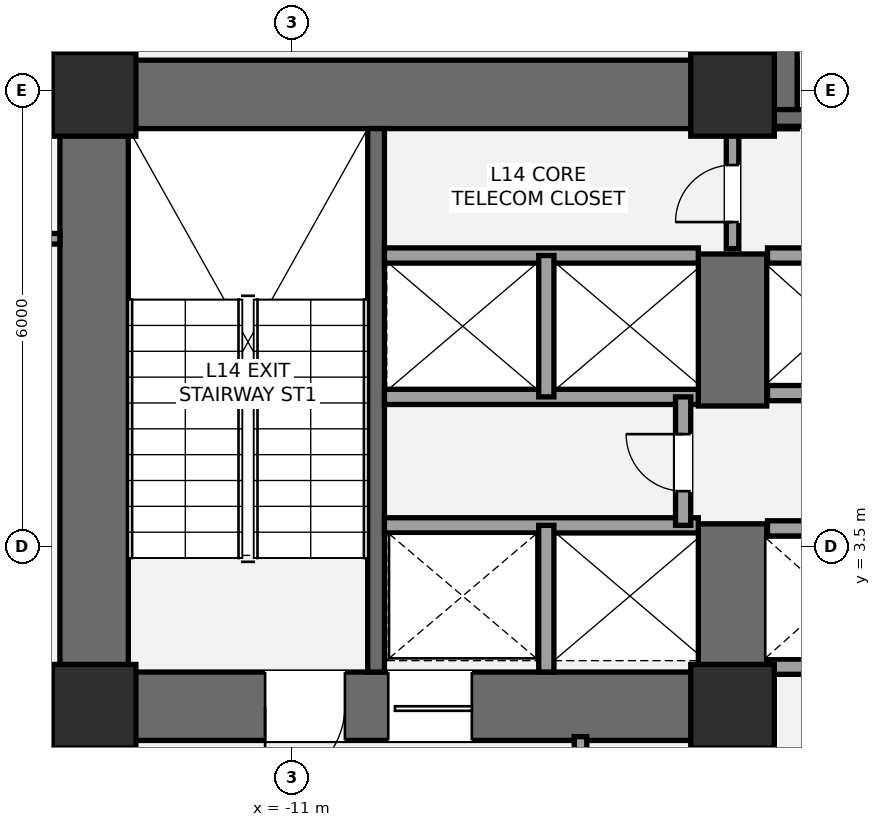
"""IFC4 building model, lengths in metres.
Left out: names, types, materials, properties, quantities, classifications, styles, units other than length and angle.
Written with IfcOpenShell. Run it as: python <this file> out.ifc"""

import sys

from ifc_helpers import new_model, si_unit, direction, frame, frame_2d, origin, origin_2d, place, context, subcontext, project, spatial, rectangle, extrude, element, fill, save


model = new_model("IFC4")
c1 = context("Model", 3, precision=1e-05, world=origin(), true_north=direction((0.0, 1.0)))
c2 = subcontext(c1, "Body", "Model", "MODEL_VIEW")
j1 = project(units=[si_unit("LENGTHUNIT", "METRE"), si_unit("PLANEANGLEUNIT", "RADIAN")], contexts=[c1])
p1 = place(None, origin())
s1 = spatial("IfcSite", under=j1, at=p1, CompositionType="ELEMENT")
p2 = place(p1, origin())
s2 = spatial("IfcBuilding", under=s1, at=p2, CompositionType="ELEMENT")
p3 = place(p2, frame((0.0, 0.0, 55.8)))
s3 = spatial("IfcBuildingStorey", under=s2, at=p3, CompositionType="ELEMENT", Elevation=55.8)
p4 = place(p3, frame((-13.6, 0.95, 0.0), z_axis=(0.0, 0.0, 1.0), x_axis=(0.0, 1.0, 0.0)))
e1 = element("IfcWall", 1, at=p4, inside=s3, PredefinedType="SHEAR", context=c2, shape_type="SweptSolid", body=[
    extrude(rectangle(XDim=8.95, YDim=0.9, at=frame_2d((4.475, 0.0))), origin(), (0.0, 0.0, 1.0), 3.6),
])
p5 = place(p3, frame((-14.05, 9.45, 0.0), z_axis=(0.0, 0.0, 1.0), x_axis=(1.0, 0.0, 0.0)))
e2 = element("IfcWall", 2, at=p5, inside=s3, PredefinedType="SHEAR", context=c2, shape_type="SweptSolid", body=[
    extrude(rectangle(XDim=9.7, YDim=0.9, at=frame_2d((4.85, 0.0))), origin(), (0.0, 0.0, 1.0), 3.6),
])
p6 = place(p3, frame((-4.75, 1.4, 0.0), z_axis=(0.0, 0.0, 1.0), x_axis=(-1.0, 0.0, 0.0)))
e3 = element("IfcWall", 3, at=p6, inside=s3, PredefinedType="SHEAR", context=c2, shape_type="SweptSolid", body=[
    extrude(rectangle(XDim=9.3, YDim=0.9, at=frame_2d((4.65, 0.0))), origin(), (0.0, 0.0, 1.0), 3.6),
])
p7 = place(p6, frame((5.55, 0.0, 0.0)))
e4 = element("IfcOpeningElement", 4, at=p7, cuts=e3, PredefinedType="OPENING", context=c2, shape_type="SweptSolid", body=[
    extrude(rectangle(XDim=1.05, YDim=2.15, at=frame_2d((0.525, 1.075))), frame((0.0, 0.46, 0.0), z_axis=(0.0, -1.0, 0.0), x_axis=(1.0, 0.0, 0.0)), (0.0, 0.0, 1.0), 0.92),
])
p8 = place(p6, frame((3.88, 0.0, 0.0)))
e5 = element("IfcOpeningElement", 5, at=p8, cuts=e3, PredefinedType="OPENING", context=c2, shape_type="SweptSolid", body=[
    extrude(rectangle(XDim=1.1, YDim=2.2, at=frame_2d((0.55, 1.1))), frame((0.0, 0.46, 0.0), z_axis=(0.0, -1.0, 0.0), x_axis=(1.0, 0.0, 0.0)), (0.0, 0.0, 1.0), 0.92),
])
p9 = place(p3, frame((-5.2, 0.95, 0.0), z_axis=(0.0, 0.0, 1.0), x_axis=(0.0, 1.0, 0.0)))
e6 = element("IfcWall", 6, at=p9, inside=s3, PredefinedType="SHEAR", context=c2, shape_type="SweptSolid", body=[
    extrude(rectangle(XDim=2.85, YDim=0.9, at=frame_2d((1.425, 0.0))), origin(), (0.0, 0.0, 1.0), 3.6),
])
p10 = place(p3, frame((-5.2, 5.35, 0.0), z_axis=(0.0, 0.0, 1.0), x_axis=(0.0, 1.0, 0.0)))
e7 = element("IfcWall", 7, at=p10, inside=s3, PredefinedType="SHEAR", context=c2, shape_type="SweptSolid", body=[
    extrude(rectangle(XDim=2.0, YDim=0.9, at=frame_2d((1.0, 0.0))), origin(), (0.0, 0.0, 1.0), 3.6),
])
p11 = place(p3, frame((-9.89, 1.85, 0.0), z_axis=(0.0, 0.0, 1.0), x_axis=(0.0, 1.0, 0.0)))
e8 = element("IfcWall", 8, at=p11, inside=s3, PredefinedType="SHEAR", context=c2, shape_type="SweptSolid", body=[
    extrude(rectangle(XDim=7.15, YDim=0.22, at=frame_2d((3.575, 0.0))), origin(), (0.0, 0.0, 1.0), 3.6),
])
p12 = place(p3, frame((-4.8, 9.0, 0.0), z_axis=(0.0, 0.0, 1.0), x_axis=(0.0, 1.0, 0.0)))
e9 = element("IfcWall", 9, at=p12, inside=s3, PredefinedType="SHEAR", context=c2, shape_type="SweptSolid", body=[
    extrude(rectangle(XDim=4.3, YDim=0.9, at=frame_2d((2.15, 0.0))), origin(), (0.0, 0.0, 1.0), 3.6),
])
p13 = place(p3, frame((-4.7, 9.14, 0.0), z_axis=(0.0, 0.0, 1.0), x_axis=(1.0, 0.0, 0.0)))
e10 = element("IfcWall", 10, at=p13, inside=s3, PredefinedType="SHEAR", context=c2, shape_type="SweptSolid", body=[
    extrude(rectangle(XDim=9.3, YDim=0.22, at=frame_2d((4.65, 0.0))), origin(), (0.0, 0.0, 1.0), 3.6),
])
p14 = place(p13, frame((1.15, 0.0, 0.0)))
e11 = element("IfcOpeningElement", 11, at=p14, cuts=e10, PredefinedType="OPENING", context=c2, shape_type="SweptSolid", body=[
    extrude(rectangle(XDim=1.05, YDim=2.15, at=frame_2d((0.525, 1.075))), frame((0.0, 0.12, 0.0), z_axis=(0.0, -1.0, 0.0), x_axis=(1.0, 0.0, 0.0)), (0.0, 0.0, 1.0), 0.24),
])
for number, where, z_axis, x_axis in (
    (12, (-13.6, 1.4, 0.0), (0.0, 0.0, 1.0), (1.0, 0.0, 0.0)),
    (13, (-13.6, 9.45, 0.0), (0.0, 0.0, 1.0), (1.0, 0.0, 0.0)),
    (14, (-5.2, 1.4, 0.0), (0.0, 0.0, 1.0), (1.0, 0.0, 0.0)),
    (15, (-5.2, 9.45, 0.0), (0.0, 0.0, 1.0), (1.0, 0.0, 0.0)),
):
    element("IfcColumn", number, at=place(p3, frame(where, z_axis=z_axis, x_axis=x_axis)), inside=s3, PredefinedType="COLUMN", context=c2, shape_type="SweptSolid", body=[
        extrude(rectangle(XDim=1.1, YDim=1.1, at=origin_2d()), origin(), (0.0, 0.0, 1.0), 3.6),
    ])
p15 = place(p3, frame((-13.45, -2.15, 0.0), z_axis=(0.0, 0.0, 1.0), x_axis=(0.0, 1.0, 0.0)))
e16 = element("IfcWall", 16, at=p15, inside=s3, PredefinedType="PARTITIONING", context=c2, shape_type="SweptSolid", body=[
    extrude(rectangle(XDim=3.15, YDim=0.165, at=frame_2d((1.575, 0.0))), origin(), (0.0, 0.0, 1.0), 2.853),
])
p16 = place(p15, frame((1.15, 0.0, 0.0)))
e17 = element("IfcOpeningElement", 17, at=p16, cuts=e16, PredefinedType="OPENING", context=c2, shape_type="SweptSolid", body=[
    extrude(rectangle(XDim=1.05, YDim=2.15, at=frame_2d((0.525, 1.075))), frame((0.0, 0.093, 0.0), z_axis=(0.0, -1.0, 0.0), x_axis=(1.0, 0.0, 0.0)), (0.0, 0.0, 1.0), 0.185),
])
p17 = place(p3, frame((-7.2, -2.15, 0.0), z_axis=(0.0, 0.0, 1.0), x_axis=(0.0, 1.0, 0.0)))
e18 = element("IfcWall", 18, at=p17, inside=s3, PredefinedType="PARTITIONING", context=c2, shape_type="SweptSolid", body=[
    extrude(rectangle(XDim=3.15, YDim=0.165, at=frame_2d((1.575, 0.0))), origin(), (0.0, 0.0, 1.0), 3.4),
])
p18 = place(p3, frame((-4.95, -2.15, 0.0), z_axis=(0.0, 0.0, 1.0), x_axis=(0.0, 1.0, 0.0)))
e19 = element("IfcWall", 19, at=p18, inside=s3, PredefinedType="SOLIDWALL", context=c2, shape_type="SweptSolid", body=[
    extrude(rectangle(XDim=3.15, YDim=0.2, at=frame_2d((1.575, 0.0))), origin(), (0.0, 0.0, 1.0), 2.853),
])
p19 = place(p18, frame((0.95, 0.0, 0.0)))
e20 = element("IfcOpeningElement", 20, at=p19, cuts=e19, PredefinedType="OPENING", context=c2, shape_type="SweptSolid", body=[
    extrude(rectangle(XDim=0.75, YDim=2.1, at=frame_2d((0.375, 1.05))), frame((0.0, 0.11, 0.0), z_axis=(0.0, -1.0, 0.0), x_axis=(1.0, 0.0, 0.0)), (0.0, 0.0, 1.0), 0.22),
])
p20 = place(p3, frame((-9.78, 3.78, 0.0), z_axis=(0.0, 0.0, 1.0), x_axis=(1.0, 0.0, 0.0)))
e21 = element("IfcWall", 21, at=p20, inside=s3, PredefinedType="SOLIDWALL", context=c2, shape_type="SweptSolid", body=[
    extrude(rectangle(XDim=4.13, YDim=0.2, at=frame_2d((2.065, 0.0))), origin(), (0.0, 0.0, 1.0), 3.4),
])
p21 = place(p3, frame((-7.65, 1.85, 0.0), z_axis=(0.0, 0.0, 1.0), x_axis=(0.0, 1.0, 0.0)))
e22 = element("IfcWall", 22, at=p21, inside=s3, PredefinedType="SOLIDWALL", context=c2, shape_type="SweptSolid", body=[
    extrude(rectangle(XDim=1.93, YDim=0.2, at=frame_2d((0.965, 0.0))), origin(), (0.0, 0.0, 1.0), 3.4),
])
for number, where, z_axis, x_axis in (
    (23, (-9.78, 5.47, 0.0), (0.0, 0.0, 1.0), (1.0, 0.0, 0.0)),
    (24, (-9.78, 7.33, 0.0), (0.0, 0.0, 1.0), (1.0, 0.0, 0.0)),
):
    element("IfcWall", number, at=place(p3, frame(where, z_axis=z_axis, x_axis=x_axis)), inside=s3, PredefinedType="SOLIDWALL", context=c2, shape_type="SweptSolid", body=[
        extrude(rectangle(XDim=4.13, YDim=0.2, at=frame_2d((2.065, 0.0))), origin(), (0.0, 0.0, 1.0), 3.4),
    ])
p22 = place(p3, frame((-7.65, 5.47, 0.0), z_axis=(0.0, 0.0, 1.0), x_axis=(0.0, 1.0, 0.0)))
e25 = element("IfcWall", 25, at=p22, inside=s3, PredefinedType="SOLIDWALL", context=c2, shape_type="SweptSolid", body=[
    extrude(rectangle(XDim=1.86, YDim=0.2, at=frame_2d((0.93, 0.0))), origin(), (0.0, 0.0, 1.0), 3.4),
])
p23 = place(p3, frame((-5.85, 3.78, 0.0), z_axis=(0.0, 0.0, 1.0), x_axis=(0.0, 1.0, 0.0)))
e26 = element("IfcWall", 26, at=p23, inside=s3, PredefinedType="SOLIDWALL", context=c2, shape_type="SweptSolid", body=[
    extrude(rectangle(XDim=1.69, YDim=0.2, at=frame_2d((0.845, 0.0))), origin(), (0.0, 0.0, 1.0), 3.4),
])
p24 = place(p23, frame((0.45, 0.0, 0.0)))
e27 = element("IfcOpeningElement", 27, at=p24, cuts=e26, PredefinedType="OPENING", context=c2, shape_type="SweptSolid", body=[
    extrude(rectangle(XDim=0.75, YDim=2.1, at=frame_2d((0.375, 1.05))), frame((0.0, 0.11, 0.0), z_axis=(0.0, -1.0, 0.0), x_axis=(1.0, 0.0, 0.0)), (0.0, 0.0, 1.0), 0.22),
])
p25 = place(p3, frame((-4.74, 1.92, 0.0), z_axis=(0.0, 0.0, 1.0), x_axis=(1.0, 0.0, 0.0)))
e28 = element("IfcWall", 28, at=p25, inside=s3, PredefinedType="SOLIDWALL", context=c2, shape_type="SweptSolid", body=[
    extrude(rectangle(XDim=3.86, YDim=0.2, at=frame_2d((1.93, 0.0))), origin(), (0.0, 0.0, 1.0), 2.39),
])
p26 = place(p25, frame((0.55, 0.0, 0.0)))
e29 = element("IfcOpeningElement", 29, at=p26, cuts=e28, PredefinedType="OPENING", context=c2, shape_type="SweptSolid", body=[
    extrude(rectangle(XDim=1.1, YDim=2.2, at=frame_2d((0.55, 1.1))), frame((0.0, 0.11, 0.0), z_axis=(0.0, -1.0, 0.0), x_axis=(1.0, 0.0, 0.0)), (0.0, 0.0, 1.0), 0.22),
])
p27 = place(p25, frame((2.55, 0.0, 0.0)))
e30 = element("IfcOpeningElement", 30, at=p27, cuts=e28, PredefinedType="OPENING", context=c2, shape_type="SweptSolid", body=[
    extrude(rectangle(XDim=1.1, YDim=2.2, at=frame_2d((0.55, 1.1))), frame((0.0, 0.11, 0.0), z_axis=(0.0, -1.0, 0.0), x_axis=(1.0, 0.0, 0.0)), (0.0, 0.0, 1.0), 0.22),
])
for number, where, z_axis, x_axis in (
    (31, (-4.74, 3.74, 0.0), (0.0, 0.0, 1.0), (1.0, 0.0, 0.0)),
    (32, (-4.74, 5.52, 0.0), (0.0, 0.0, 1.0), (1.0, 0.0, 0.0)),
    (33, (-4.74, 7.33, 0.0), (0.0, 0.0, 1.0), (1.0, 0.0, 0.0)),
):
    element("IfcWall", number, at=place(p3, frame(where, z_axis=z_axis, x_axis=x_axis)), inside=s3, PredefinedType="SOLIDWALL", context=c2, shape_type="SweptSolid", body=[
        extrude(rectangle(XDim=3.86, YDim=0.2, at=frame_2d((1.93, 0.0))), origin(), (0.0, 0.0, 1.0), 3.4),
    ])
p28 = place(p3, frame((-5.2, 7.42, 0.0), z_axis=(0.0, 0.0, 1.0), x_axis=(0.0, 1.0, 0.0)))
e34 = element("IfcWall", 34, at=p28, inside=s3, PredefinedType="PARTITIONING", context=c2, shape_type="SweptSolid", body=[
    extrude(rectangle(XDim=1.58, YDim=0.165, at=frame_2d((0.79, 0.0))), origin(), (0.0, 0.0, 1.0), 3.4),
])
p29 = place(p28, frame((0.35, 0.0, 0.0)))
e35 = element("IfcOpeningElement", 35, at=p29, cuts=e34, PredefinedType="OPENING", context=c2, shape_type="SweptSolid", body=[
    extrude(rectangle(XDim=0.75, YDim=2.1, at=frame_2d((0.375, 1.05))), frame((0.0, 0.093, 0.0), z_axis=(0.0, -1.0, 0.0), x_axis=(1.0, 0.0, 0.0)), (0.0, 0.0, 1.0), 0.185),
])
p30 = place(p3, frame((-25.684, 7.55, 0.0), z_axis=(0.0, 0.0, 1.0), x_axis=(1.0, 0.0, 0.0)))
e36 = element("IfcWall", 36, at=p30, inside=s3, PredefinedType="PARTITIONING", context=c2, shape_type="SweptSolid", body=[
    extrude(rectangle(XDim=11.634, YDim=0.14, at=frame_2d((5.817, 0.0))), origin(), (0.0, 0.0, 1.0), 2.853),
])
p31 = place(p30, frame((1.9, 0.0, 0.0)))
e37 = element("IfcOpeningElement", 37, at=p31, cuts=e36, PredefinedType="OPENING", context=c2, shape_type="SweptSolid", body=[
    extrude(rectangle(XDim=0.92, YDim=2.15, at=frame_2d((0.46, 1.075))), frame((0.0, 0.08, 0.0), z_axis=(0.0, -1.0, 0.0), x_axis=(1.0, 0.0, 0.0)), (0.0, 0.0, 1.0), 0.16),
])
p32 = place(p7, origin())
e38 = element("IfcDoor", 38, at=p32, inside=s3, OperationType="SINGLE_SWING_RIGHT", PredefinedType="DOOR", context=c2, shape_type="SweptSolid", body=[
    extrude(rectangle(XDim=1.05, YDim=2.15, at=frame_2d((0.525, 1.075))), frame((0.0, 0.025, 0.0), z_axis=(0.0, -1.0, 0.0), x_axis=(1.0, 0.0, 0.0)), (0.0, 0.0, 1.0), 0.05),
])
fill(e4, e38)
p33 = place(p8, origin())
e39 = element("IfcDoor", 39, at=p33, inside=s3, OperationType="SLIDING_TO_LEFT", PredefinedType="DOOR", context=c2, shape_type="SweptSolid", body=[
    extrude(rectangle(XDim=1.1, YDim=2.2, at=frame_2d((0.55, 1.1))), frame((0.0, 0.025, 0.0), z_axis=(0.0, -1.0, 0.0), x_axis=(1.0, 0.0, 0.0)), (0.0, 0.0, 1.0), 0.05),
])
fill(e5, e39)
p34 = place(p24, origin())
e40 = element("IfcDoor", 40, at=p34, inside=s3, OperationType="SINGLE_SWING_RIGHT", PredefinedType="DOOR", context=c2, shape_type="SweptSolid", body=[
    extrude(rectangle(XDim=0.75, YDim=2.1, at=frame_2d((0.375, 1.05))), frame((0.0, 0.025, 0.0), z_axis=(0.0, -1.0, 0.0), x_axis=(1.0, 0.0, 0.0)), (0.0, 0.0, 1.0), 0.05),
])
fill(e27, e40)
p35 = place(p29, origin())
e41 = element("IfcDoor", 41, at=p35, inside=s3, OperationType="SINGLE_SWING_LEFT", PredefinedType="DOOR", context=c2, shape_type="SweptSolid", body=[
    extrude(rectangle(XDim=0.75, YDim=2.1, at=frame_2d((0.375, 1.05))), frame((0.0, 0.025, 0.0), z_axis=(0.0, -1.0, 0.0), x_axis=(1.0, 0.0, 0.0)), (0.0, 0.0, 1.0), 0.05),
])
fill(e35, e41)
save(model, sys.argv[1])
